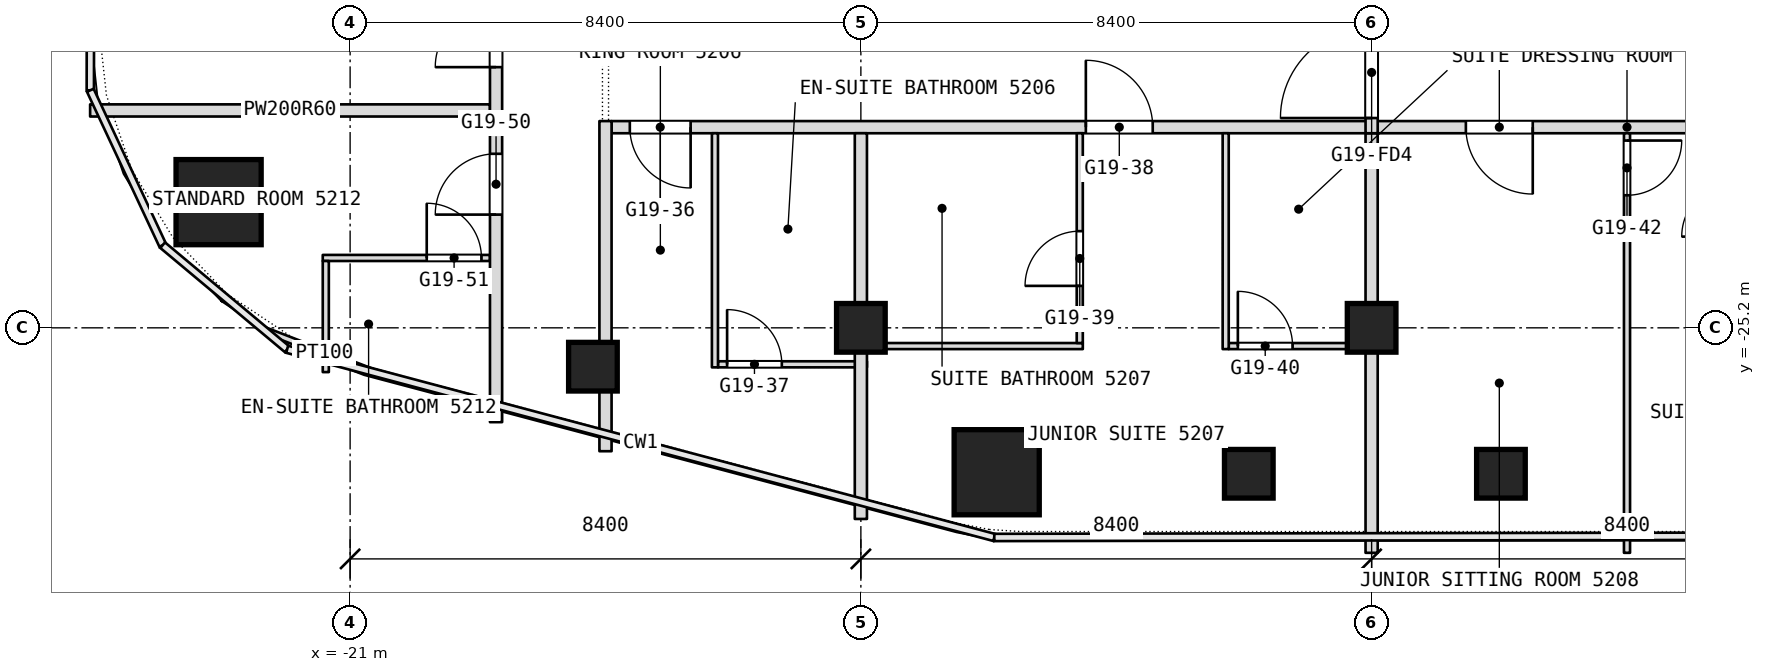
"""IFC4 building model, lengths in metres.
Left out: names, types, materials, properties, quantities, classifications, styles, units other than length and angle.
Written with IfcOpenShell. Run it as: python <this file> out.ifc"""

import sys

from ifc_helpers import new_model, si_unit, direction, frame, frame_2d, origin, origin_2d, place, context, subcontext, project, spatial, rectangle, extrude, element, fill, save


model = new_model("IFC4")
c1 = context("Model", 3, precision=1e-05, world=origin(), true_north=direction((0.0, 1.0)))
c2 = subcontext(c1, "Body", "Model", "MODEL_VIEW")
j1 = project(units=[si_unit("LENGTHUNIT", "METRE"), si_unit("PLANEANGLEUNIT", "RADIAN")], contexts=[c1])
p1 = place(None, origin())
s1 = spatial("IfcSite", under=j1, at=p1, CompositionType="ELEMENT")
p2 = place(p1, origin())
s2 = spatial("IfcBuilding", under=s1, at=p2, CompositionType="ELEMENT")
p3 = place(p2, frame((0.0, 0.0, 223.7)))
s3 = spatial("IfcBuildingStorey", under=s2, at=p3, CompositionType="ELEMENT", Elevation=223.7)
for number, where, z_axis, x_axis in (
    (1, (-23.163, -23.133, 0.0), (0.0, 0.0, 1.0), (1.0, 0.0, 0.0)),
    (2, (-10.366, -27.575, 0.0), (0.0, 0.0, 1.0), (1.0, 0.0, 0.0)),
):
    element("IfcColumn", number, at=place(p3, frame(where, z_axis=z_axis, x_axis=x_axis)), inside=s3, PredefinedType="COLUMN", context=c2, shape_type="SweptSolid", body=[
        extrude(rectangle(XDim=1.4, YDim=1.4, at=origin_2d()), origin(), (0.0, 0.0, 1.0), 3.6),
    ])
for number, where, z_axis, x_axis in (
    (3, (-12.6, -25.2, 0.0), (0.0, 0.0, 1.0), (1.0, 0.0, 0.0)),
    (4, (-4.2, -25.2, 0.0), (0.0, 0.0, 1.0), (1.0, 0.0, 0.0)),
    (5, (-2.073, -27.6, 0.0), (0.0, 0.0, 1.0), (1.0, 0.0, 0.0)),
    (6, (-6.22, -27.6, 0.0), (0.0, 0.0, 1.0), (1.0, 0.0, 0.0)),
    (7, (-17.007, -25.839, 0.0), (0.0, 0.0, 1.0), (1.0, 0.0, 0.0)),
):
    element("IfcColumn", number, at=place(p3, frame(where, z_axis=z_axis, x_axis=x_axis)), inside=s3, PredefinedType="COLUMN", context=c2, shape_type="SweptSolid", body=[
        extrude(rectangle(XDim=0.8, YDim=0.8, at=origin_2d()), origin(), (0.0, 0.0, 1.0), 3.6),
    ])
p4 = place(p3, frame((-22.386, -25.247, 0.0), z_axis=(0.0, 0.0, 1.0), x_axis=(0.932741240306, -0.360546499959, 0.0)))
e8 = element("IfcWall", 8, at=p4, inside=s3, PredefinedType="PARTITIONING", context=c2, shape_type="SweptSolid", body=[
    extrude(rectangle(XDim=2.066, YDim=0.1, at=frame_2d((1.033, 0.0))), origin(), (0.0, 0.0, 1.0), 3.34),
])
p5 = place(p3, frame((-14.95, -25.8, 0.0), z_axis=(0.0, 0.0, 1.0), x_axis=(1.0, 0.0, 0.0)))
e9 = element("IfcWall", 9, at=p5, inside=s3, PredefinedType="PARTITIONING", context=c2, shape_type="SweptSolid", body=[
    extrude(rectangle(XDim=2.45, YDim=0.1, at=frame_2d((1.225, 0.0))), origin(), (0.0, 0.0, 1.0), 3.34),
])
p6 = place(p5, frame((0.15, 0.0, 0.0)))
e10 = element("IfcOpeningElement", 10, at=p6, cuts=e9, PredefinedType="OPENING", context=c2, shape_type="SweptSolid", body=[
    extrude(rectangle(XDim=0.9, YDim=2.1, at=frame_2d((0.45, 1.05))), frame((0.0, 0.05, 0.0), z_axis=(0.0, -1.0, 0.0), x_axis=(1.0, 0.0, 0.0)), (0.0, 0.0, 1.0), 0.1),
])
p7 = place(p3, frame((-12.5, -25.5, 0.0), z_axis=(0.0, 0.0, 1.0), x_axis=(1.0, 0.0, 0.0)))
e11 = element("IfcWall", 11, at=p7, inside=s3, PredefinedType="PARTITIONING", context=c2, shape_type="SweptSolid", body=[
    extrude(rectangle(XDim=3.55, YDim=0.1, at=frame_2d((1.775, 0.0))), origin(), (0.0, 0.0, 1.0), 3.34),
])
p8 = place(p3, frame((-6.55, -25.5, 0.0), z_axis=(0.0, 0.0, 1.0), x_axis=(1.0, 0.0, 0.0)))
e12 = element("IfcWall", 12, at=p8, inside=s3, PredefinedType="PARTITIONING", context=c2, shape_type="SweptSolid", body=[
    extrude(rectangle(XDim=2.45, YDim=0.1, at=frame_2d((1.225, 0.0))), origin(), (0.0, 0.0, 1.0), 3.34),
])
p9 = place(p8, frame((0.15, 0.0, 0.0)))
e13 = element("IfcOpeningElement", 13, at=p9, cuts=e12, PredefinedType="OPENING", context=c2, shape_type="SweptSolid", body=[
    extrude(rectangle(XDim=0.9, YDim=2.1, at=frame_2d((0.45, 1.05))), frame((0.0, 0.05, 0.0), z_axis=(0.0, -1.0, 0.0), x_axis=(1.0, 0.0, 0.0)), (0.0, 0.0, 1.0), 0.1),
])
p10 = place(p3, frame((-21.45, -24.051, 0.0), z_axis=(0.0, 0.0, 1.0), x_axis=(1.0, 0.0, 0.0)))
e14 = element("IfcWall", 14, at=p10, inside=s3, PredefinedType="PARTITIONING", context=c2, shape_type="SweptSolid", body=[
    extrude(rectangle(XDim=2.75, YDim=0.1, at=frame_2d((1.375, 0.0))), origin(), (0.0, 0.0, 1.0), 3.34),
])
p11 = place(p10, frame((1.71, 0.0, 0.0)))
e15 = element("IfcOpeningElement", 15, at=p11, cuts=e14, PredefinedType="OPENING", context=c2, shape_type="SweptSolid", body=[
    extrude(rectangle(XDim=0.9, YDim=2.1, at=frame_2d((0.45, 1.05))), frame((0.0, 0.05, 0.0), z_axis=(0.0, -1.0, 0.0), x_axis=(1.0, 0.0, 0.0)), (0.0, 0.0, 1.0), 0.1),
])
p12 = place(p3, frame((-16.7, -21.9, 0.0), z_axis=(0.0, 0.0, 1.0), x_axis=(1.0, 0.0, 0.0)))
e16 = element("IfcWall", 16, at=p12, inside=s3, PredefinedType="PARTITIONING", context=c2, shape_type="SweptSolid", body=[
    extrude(rectangle(XDim=33.4, YDim=0.2, at=frame_2d((16.7, 0.0))), origin(), (0.0, 0.0, 1.0), 3.34),
])
p13 = place(p12, frame((0.3, 0.0, 0.0)))
e17 = element("IfcOpeningElement", 17, at=p13, cuts=e16, PredefinedType="OPENING", context=c2, shape_type="SweptSolid", body=[
    extrude(rectangle(XDim=1.0, YDim=2.1, at=frame_2d((0.5, 1.05))), frame((0.0, 0.1, 0.0), z_axis=(0.0, -1.0, 0.0), x_axis=(1.0, 0.0, 0.0)), (0.0, 0.0, 1.0), 0.2),
])
p14 = place(p12, frame((7.8, 0.0, 0.0)))
e18 = element("IfcOpeningElement", 18, at=p14, cuts=e16, PredefinedType="OPENING", context=c2, shape_type="SweptSolid", body=[
    extrude(rectangle(XDim=1.1, YDim=2.1, at=frame_2d((0.55, 1.05))), frame((0.0, 0.1, 0.0), z_axis=(0.0, -1.0, 0.0), x_axis=(1.0, 0.0, 0.0)), (0.0, 0.0, 1.0), 0.2),
])
p15 = place(p12, frame((14.05, 0.0, 0.0)))
e19 = element("IfcOpeningElement", 19, at=p15, cuts=e16, PredefinedType="OPENING", context=c2, shape_type="SweptSolid", body=[
    extrude(rectangle(XDim=1.1, YDim=2.1, at=frame_2d((0.55, 1.05))), frame((0.0, 0.1, 0.0), z_axis=(0.0, -1.0, 0.0), x_axis=(1.0, 0.0, 0.0)), (0.0, 0.0, 1.0), 0.2),
])
p16 = place(p12, frame((23.7, 0.0, 0.0)))
e20 = element("IfcOpeningElement", 20, at=p16, cuts=e16, PredefinedType="OPENING", context=c2, shape_type="SweptSolid", body=[
    extrude(rectangle(XDim=1.0, YDim=2.1, at=frame_2d((0.5, 1.05))), frame((0.0, 0.1, 0.0), z_axis=(0.0, -1.0, 0.0), x_axis=(1.0, 0.0, 0.0)), (0.0, 0.0, 1.0), 0.2),
])
p17 = place(p12, frame((25.5, 0.0, 0.0)))
e21 = element("IfcOpeningElement", 21, at=p17, cuts=e16, PredefinedType="OPENING", context=c2, shape_type="SweptSolid", body=[
    extrude(rectangle(XDim=1.0, YDim=2.1, at=frame_2d((0.5, 1.05))), frame((0.0, 0.1, 0.0), z_axis=(0.0, -1.0, 0.0), x_axis=(1.0, 0.0, 0.0)), (0.0, 0.0, 1.0), 0.2),
])
p18 = place(p12, frame((29.7, 0.0, 0.0)))
e22 = element("IfcOpeningElement", 22, at=p18, cuts=e16, PredefinedType="OPENING", context=c2, shape_type="SweptSolid", body=[
    extrude(rectangle(XDim=1.0, YDim=2.1, at=frame_2d((0.5, 1.05))), frame((0.0, 0.1, 0.0), z_axis=(0.0, -1.0, 0.0), x_axis=(1.0, 0.0, 0.0)), (0.0, 0.0, 1.0), 0.2),
])
p19 = place(p3, frame((-25.276, -21.625, 0.0), z_axis=(0.0, 0.0, 1.0), x_axis=(1.0, 0.0, 0.0)))
e23 = element("IfcWall", 23, at=p19, inside=s3, PredefinedType="PARTITIONING", context=c2, shape_type="SweptSolid", body=[
    extrude(rectangle(XDim=6.576, YDim=0.2, at=frame_2d((3.288, 0.0))), origin(), (0.0, 0.0, 1.0), 3.34),
])
p20 = place(p3, frame((0.0, -28.9, 0.0), z_axis=(0.0, 0.0, 1.0), x_axis=(0.0, 1.0, 0.0)))
e24 = element("IfcWall", 24, at=p20, inside=s3, PredefinedType="PARTITIONING", context=c2, shape_type="SweptSolid", body=[
    extrude(rectangle(XDim=6.9, YDim=0.1, at=frame_2d((3.45, 0.0))), origin(), (0.0, 0.0, 1.0), 3.34),
])
p21 = place(p20, frame((5.88, 0.0, 0.0)))
e25 = element("IfcOpeningElement", 25, at=p21, cuts=e24, PredefinedType="OPENING", context=c2, shape_type="SweptSolid", body=[
    extrude(rectangle(XDim=0.9, YDim=2.1, at=frame_2d((0.45, 1.05))), frame((0.0, 0.05, 0.0), z_axis=(0.0, -1.0, 0.0), x_axis=(1.0, 0.0, 0.0)), (0.0, 0.0, 1.0), 0.1),
])
p22 = place(p3, frame((-4.2, -28.9, 0.0), z_axis=(0.0, 0.0, 1.0), x_axis=(0.0, 1.0, 0.0)))
e26 = element("IfcWall", 26, at=p22, inside=s3, PredefinedType="PARTITIONING", context=c2, shape_type="SweptSolid", body=[
    extrude(rectangle(XDim=6.9, YDim=0.2, at=frame_2d((3.45, 0.0))), origin(), (0.0, 0.0, 1.0), 3.34),
])
p23 = place(p3, frame((-4.2, -22.0, 0.0), z_axis=(0.0, 0.0, 1.0), x_axis=(0.0, 1.0, 0.0)))
e27 = element("IfcWall", 27, at=p23, inside=s3, PredefinedType="PARTITIONING", context=c2, shape_type="SweptSolid", body=[
    extrude(rectangle(XDim=8.4, YDim=0.2, at=frame_2d((4.2, 0.0))), origin(), (0.0, 0.0, 1.0), 3.34),
])
p24 = place(p23, frame((0.25, 0.0, 0.0)))
e28 = element("IfcOpeningElement", 28, at=p24, cuts=e27, PredefinedType="OPENING", context=c2, shape_type="SweptSolid", body=[
    extrude(rectangle(XDim=1.5, YDim=2.1, at=frame_2d((0.75, 1.05))), frame((0.0, 0.1, 0.0), z_axis=(0.0, -1.0, 0.0), x_axis=(1.0, 0.0, 0.0)), (0.0, 0.0, 1.0), 0.2),
])
p25 = place(p3, frame((-6.6, -25.55, 0.0), z_axis=(0.0, 0.0, 1.0), x_axis=(0.0, 1.0, 0.0)))
e29 = element("IfcWall", 29, at=p25, inside=s3, PredefinedType="PARTITIONING", context=c2, shape_type="SweptSolid", body=[
    extrude(rectangle(XDim=3.55, YDim=0.1, at=frame_2d((1.775, 0.0))), origin(), (0.0, 0.0, 1.0), 3.34),
])
p26 = place(p3, frame((-9.0, -25.45, 0.0), z_axis=(0.0, 0.0, 1.0), x_axis=(0.0, 1.0, 0.0)))
e30 = element("IfcWall", 30, at=p26, inside=s3, PredefinedType="PARTITIONING", context=c2, shape_type="SweptSolid", body=[
    extrude(rectangle(XDim=3.45, YDim=0.1, at=frame_2d((1.725, 0.0))), origin(), (0.0, 0.0, 1.0), 3.34),
])
p27 = place(p26, frame((0.94, 0.0, 0.0)))
e31 = element("IfcOpeningElement", 31, at=p27, cuts=e30, PredefinedType="OPENING", context=c2, shape_type="SweptSolid", body=[
    extrude(rectangle(XDim=0.9, YDim=2.1, at=frame_2d((0.45, 1.05))), frame((0.0, 0.05, 0.0), z_axis=(0.0, -1.0, 0.0), x_axis=(1.0, 0.0, 0.0)), (0.0, 0.0, 1.0), 0.1),
])
p28 = place(p3, frame((-12.6, -28.343, 0.0), z_axis=(0.0, 0.0, 1.0), x_axis=(0.0, 1.0, 0.0)))
e32 = element("IfcWall", 32, at=p28, inside=s3, PredefinedType="PARTITIONING", context=c2, shape_type="SweptSolid", body=[
    extrude(rectangle(XDim=6.343, YDim=0.2, at=frame_2d((3.171, 0.0))), origin(), (0.0, 0.0, 1.0), 3.34),
])
p29 = place(p3, frame((-15.0, -25.85, 0.0), z_axis=(0.0, 0.0, 1.0), x_axis=(0.0, 1.0, 0.0)))
e33 = element("IfcWall", 33, at=p29, inside=s3, PredefinedType="PARTITIONING", context=c2, shape_type="SweptSolid", body=[
    extrude(rectangle(XDim=3.85, YDim=0.1, at=frame_2d((1.925, 0.0))), origin(), (0.0, 0.0, 1.0), 3.34),
])
p30 = place(p3, frame((-16.8, -27.229, 0.0), z_axis=(0.0, 0.0, 1.0), x_axis=(0.0, 1.0, 0.0)))
e34 = element("IfcWall", 34, at=p30, inside=s3, PredefinedType="PARTITIONING", context=c2, shape_type="SweptSolid", body=[
    extrude(rectangle(XDim=5.429, YDim=0.2, at=frame_2d((2.714, 0.0))), origin(), (0.0, 0.0, 1.0), 3.34),
])
p31 = place(p3, frame((-18.6, -26.751, 0.0), z_axis=(0.0, 0.0, 1.0), x_axis=(0.0, 1.0, 0.0)))
e35 = element("IfcWall", 35, at=p31, inside=s3, PredefinedType="PARTITIONING", context=c2, shape_type="SweptSolid", body=[
    extrude(rectangle(XDim=49.091, YDim=0.2, at=frame_2d((24.545, 0.0))), origin(), (0.0, 0.0, 1.0), 3.34),
])
p32 = place(p31, frame((3.413, 0.0, 0.0)))
e36 = element("IfcOpeningElement", 36, at=p32, cuts=e35, PredefinedType="OPENING", context=c2, shape_type="SweptSolid", body=[
    extrude(rectangle(XDim=1.0, YDim=2.1, at=frame_2d((0.5, 1.05))), frame((0.0, 0.1, 0.0), z_axis=(0.0, -1.0, 0.0), x_axis=(1.0, 0.0, 0.0)), (0.0, 0.0, 1.0), 0.2),
])
p33 = place(p31, frame((5.838, 0.0, 0.0)))
e37 = element("IfcOpeningElement", 37, at=p33, cuts=e35, PredefinedType="OPENING", context=c2, shape_type="SweptSolid", body=[
    extrude(rectangle(XDim=1.0, YDim=2.1, at=frame_2d((0.5, 1.05))), frame((0.0, 0.1, 0.0), z_axis=(0.0, -1.0, 0.0), x_axis=(1.0, 0.0, 0.0)), (0.0, 0.0, 1.0), 0.2),
])
p34 = place(p31, frame((10.351, 0.0, 0.0)))
e38 = element("IfcOpeningElement", 38, at=p34, cuts=e35, PredefinedType="OPENING", context=c2, shape_type="SweptSolid", body=[
    extrude(rectangle(XDim=1.0, YDim=2.1, at=frame_2d((0.5, 1.05))), frame((0.0, 0.1, 0.0), z_axis=(0.0, -1.0, 0.0), x_axis=(1.0, 0.0, 0.0)), (0.0, 0.0, 1.0), 0.2),
])
p35 = place(p31, frame((16.951, 0.0, 0.0)))
e39 = element("IfcOpeningElement", 39, at=p35, cuts=e35, PredefinedType="OPENING", context=c2, shape_type="SweptSolid", body=[
    extrude(rectangle(XDim=1.0, YDim=2.1, at=frame_2d((0.5, 1.05))), frame((0.0, 0.1, 0.0), z_axis=(0.0, -1.0, 0.0), x_axis=(1.0, 0.0, 0.0)), (0.0, 0.0, 1.0), 0.2),
])
p36 = place(p31, frame((21.151, 0.0, 0.0)))
e40 = element("IfcOpeningElement", 40, at=p36, cuts=e35, PredefinedType="OPENING", context=c2, shape_type="SweptSolid", body=[
    extrude(rectangle(XDim=1.0, YDim=2.1, at=frame_2d((0.5, 1.05))), frame((0.0, 0.1, 0.0), z_axis=(0.0, -1.0, 0.0), x_axis=(1.0, 0.0, 0.0)), (0.0, 0.0, 1.0), 0.2),
])
p37 = place(p31, frame((22.951, 0.0, 0.0)))
e41 = element("IfcOpeningElement", 41, at=p37, cuts=e35, PredefinedType="OPENING", context=c2, shape_type="SweptSolid", body=[
    extrude(rectangle(XDim=1.0, YDim=2.1, at=frame_2d((0.5, 1.05))), frame((0.0, 0.1, 0.0), z_axis=(0.0, -1.0, 0.0), x_axis=(1.0, 0.0, 0.0)), (0.0, 0.0, 1.0), 0.2),
])
p38 = place(p31, frame((30.351, 0.0, 0.0)))
e42 = element("IfcOpeningElement", 42, at=p38, cuts=e35, PredefinedType="OPENING", context=c2, shape_type="SweptSolid", body=[
    extrude(rectangle(XDim=1.1, YDim=2.1, at=frame_2d((0.55, 1.05))), frame((0.0, 0.1, 0.0), z_axis=(0.0, -1.0, 0.0), x_axis=(1.0, 0.0, 0.0)), (0.0, 0.0, 1.0), 0.2),
])
p39 = place(p31, frame((37.951, 0.0, 0.0)))
e43 = element("IfcOpeningElement", 43, at=p39, cuts=e35, PredefinedType="OPENING", context=c2, shape_type="SweptSolid", body=[
    extrude(rectangle(XDim=1.0, YDim=2.1, at=frame_2d((0.5, 1.05))), frame((0.0, 0.1, 0.0), z_axis=(0.0, -1.0, 0.0), x_axis=(1.0, 0.0, 0.0)), (0.0, 0.0, 1.0), 0.2),
])
p40 = place(p31, frame((39.751, 0.0, 0.0)))
e44 = element("IfcOpeningElement", 44, at=p40, cuts=e35, PredefinedType="OPENING", context=c2, shape_type="SweptSolid", body=[
    extrude(rectangle(XDim=1.0, YDim=2.1, at=frame_2d((0.5, 1.05))), frame((0.0, 0.1, 0.0), z_axis=(0.0, -1.0, 0.0), x_axis=(1.0, 0.0, 0.0)), (0.0, 0.0, 1.0), 0.2),
])
p41 = place(p31, frame((44.051, 0.0, 0.0)))
e45 = element("IfcOpeningElement", 45, at=p41, cuts=e35, PredefinedType="OPENING", context=c2, shape_type="SweptSolid", body=[
    extrude(rectangle(XDim=1.0, YDim=2.1, at=frame_2d((0.5, 1.05))), frame((0.0, 0.1, 0.0), z_axis=(0.0, -1.0, 0.0), x_axis=(1.0, 0.0, 0.0)), (0.0, 0.0, 1.0), 0.2),
])
p42 = place(p3, frame((-21.4, -25.928, 0.0), z_axis=(0.0, 0.0, 1.0), x_axis=(0.0, 1.0, 0.0)))
e46 = element("IfcWall", 46, at=p42, inside=s3, PredefinedType="PARTITIONING", context=c2, shape_type="SweptSolid", body=[
    extrude(rectangle(XDim=1.827, YDim=0.1, at=frame_2d((0.914, 0.0))), origin(), (0.0, 0.0, 1.0), 3.34),
])
p43 = place(p6, origin())
e47 = element("IfcDoor", 47, at=p43, inside=s3, OperationType="SINGLE_SWING_LEFT", PredefinedType="DOOR", context=c2, shape_type="SweptSolid", body=[
    extrude(rectangle(XDim=0.9, YDim=2.1, at=frame_2d((0.45, 1.05))), frame((0.0, 0.025, 0.0), z_axis=(0.0, -1.0, 0.0), x_axis=(1.0, 0.0, 0.0)), (0.0, 0.0, 1.0), 0.05),
])
fill(e10, e47)
p44 = place(p9, origin())
e48 = element("IfcDoor", 48, at=p44, inside=s3, OperationType="SINGLE_SWING_LEFT", PredefinedType="DOOR", context=c2, shape_type="SweptSolid", body=[
    extrude(rectangle(XDim=0.9, YDim=2.1, at=frame_2d((0.45, 1.05))), frame((0.0, 0.025, 0.0), z_axis=(0.0, -1.0, 0.0), x_axis=(1.0, 0.0, 0.0)), (0.0, 0.0, 1.0), 0.05),
])
fill(e13, e48)
p45 = place(p11, origin())
e49 = element("IfcDoor", 49, at=p45, inside=s3, OperationType="SINGLE_SWING_LEFT", PredefinedType="DOOR", context=c2, shape_type="SweptSolid", body=[
    extrude(rectangle(XDim=0.9, YDim=2.1, at=frame_2d((0.45, 1.05))), frame((0.0, 0.025, 0.0), z_axis=(0.0, -1.0, 0.0), x_axis=(1.0, 0.0, 0.0)), (0.0, 0.0, 1.0), 0.05),
])
fill(e15, e49)
p46 = place(p13, origin())
e50 = element("IfcDoor", 50, at=p46, inside=s3, OperationType="SINGLE_SWING_RIGHT", PredefinedType="DOOR", context=c2, shape_type="SweptSolid", body=[
    extrude(rectangle(XDim=1.0, YDim=2.1, at=frame_2d((0.5, 1.05))), frame((0.0, 0.025, 0.0), z_axis=(0.0, -1.0, 0.0), x_axis=(1.0, 0.0, 0.0)), (0.0, 0.0, 1.0), 0.05),
])
fill(e17, e50)
p47 = place(p14, origin())
e51 = element("IfcDoor", 51, at=p47, inside=s3, OperationType="SINGLE_SWING_RIGHT", PredefinedType="DOOR", context=c2, shape_type="SweptSolid", body=[
    extrude(rectangle(XDim=1.1, YDim=2.1, at=frame_2d((0.55, 1.05))), frame((0.0, 0.025, 0.0), z_axis=(0.0, -1.0, 0.0), x_axis=(1.0, 0.0, 0.0)), (0.0, 0.0, 1.0), 0.05),
])
fill(e18, e51)
p48 = place(p15, origin())
e52 = element("IfcDoor", 52, at=p48, inside=s3, OperationType="SINGLE_SWING_LEFT", PredefinedType="DOOR", context=c2, shape_type="SweptSolid", body=[
    extrude(rectangle(XDim=1.1, YDim=2.1, at=frame_2d((0.55, 1.05))), frame((0.0, 0.025, 0.0), z_axis=(0.0, -1.0, 0.0), x_axis=(1.0, 0.0, 0.0)), (0.0, 0.0, 1.0), 0.05),
])
fill(e19, e52)
p49 = place(p21, origin())
e53 = element("IfcDoor", 53, at=p49, inside=s3, OperationType="SINGLE_SWING_LEFT", PredefinedType="DOOR", context=c2, shape_type="SweptSolid", body=[
    extrude(rectangle(XDim=0.9, YDim=2.1, at=frame_2d((0.45, 1.05))), frame((0.0, 0.025, 0.0), z_axis=(0.0, -1.0, 0.0), x_axis=(1.0, 0.0, 0.0)), (0.0, 0.0, 1.0), 0.05),
])
fill(e25, e53)
p50 = place(p27, origin())
e54 = element("IfcDoor", 54, at=p50, inside=s3, OperationType="SINGLE_SWING_LEFT", PredefinedType="DOOR", context=c2, shape_type="SweptSolid", body=[
    extrude(rectangle(XDim=0.9, YDim=2.1, at=frame_2d((0.45, 1.05))), frame((0.0, 0.025, 0.0), z_axis=(0.0, -1.0, 0.0), x_axis=(1.0, 0.0, 0.0)), (0.0, 0.0, 1.0), 0.05),
])
fill(e31, e54)
p51 = place(p32, origin())
e55 = element("IfcDoor", 55, at=p51, inside=s3, OperationType="SINGLE_SWING_LEFT", PredefinedType="DOOR", context=c2, shape_type="SweptSolid", body=[
    extrude(rectangle(XDim=1.0, YDim=2.1, at=frame_2d((0.5, 1.05))), frame((0.0, 0.025, 0.0), z_axis=(0.0, -1.0, 0.0), x_axis=(1.0, 0.0, 0.0)), (0.0, 0.0, 1.0), 0.05),
])
fill(e36, e55)
p52 = place(p33, origin())
e56 = element("IfcDoor", 56, at=p52, inside=s3, OperationType="SINGLE_SWING_LEFT", PredefinedType="DOOR", context=c2, shape_type="SweptSolid", body=[
    extrude(rectangle(XDim=1.0, YDim=2.1, at=frame_2d((0.5, 1.05))), frame((0.0, 0.025, 0.0), z_axis=(0.0, -1.0, 0.0), x_axis=(1.0, 0.0, 0.0)), (0.0, 0.0, 1.0), 0.05),
])
fill(e37, e56)
p53 = place(p24, origin())
e57 = element("IfcDoor", 57, at=p53, inside=s3, OperationType="DOUBLE_DOOR_DOUBLE_SWING", PredefinedType="DOOR", context=c2, shape_type="SweptSolid", body=[
    extrude(rectangle(XDim=1.5, YDim=2.1, at=frame_2d((0.75, 1.05))), frame((0.0, 0.025, 0.0), z_axis=(0.0, -1.0, 0.0), x_axis=(1.0, 0.0, 0.0)), (0.0, 0.0, 1.0), 0.05),
])
fill(e28, e57)
save(model, sys.argv[1])
